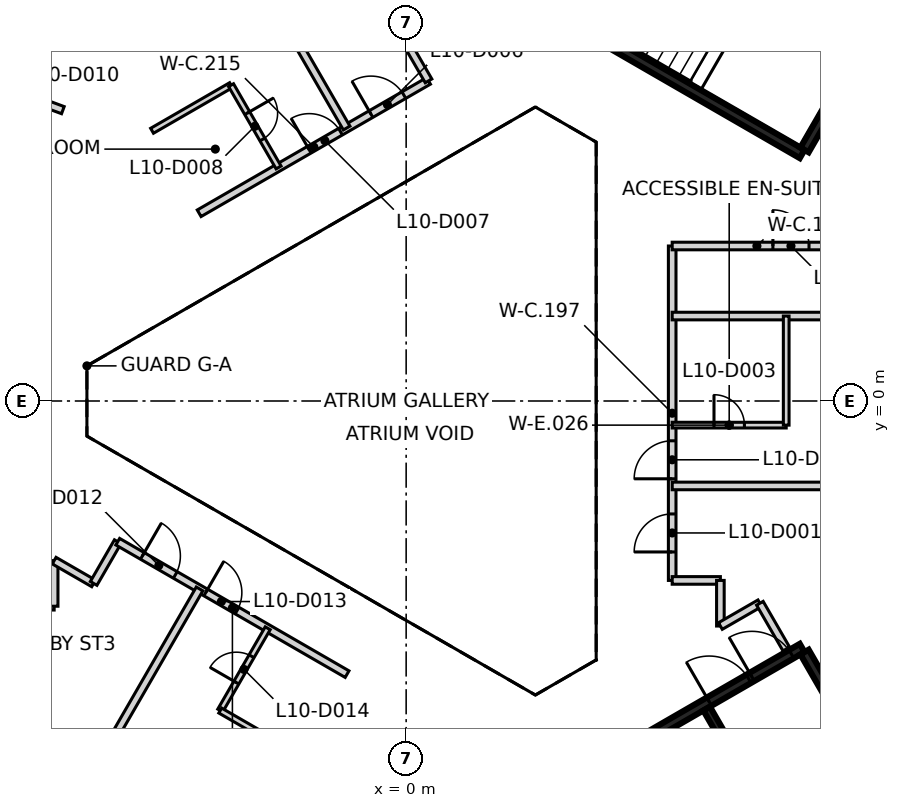
"""IFC4 building model, lengths in metres.
Left out: names, types, materials, properties, quantities, classifications, styles, units other than length and angle.
Written with IfcOpenShell. Run it as: python <this file> out.ifc"""

import sys

from ifc_helpers import new_model, si_unit, direction, frame, frame_2d, origin, place, context, subcontext, project, spatial, rectangle, extrude, element, fill, save


model = new_model("IFC4")
c1 = context("Model", 3, precision=1e-05, world=origin(), true_north=direction((0.0, 1.0)))
c2 = subcontext(c1, "Body", "Model", "MODEL_VIEW")
j1 = project(units=[si_unit("LENGTHUNIT", "METRE"), si_unit("PLANEANGLEUNIT", "RADIAN")], contexts=[c1])
p1 = place(None, origin())
s1 = spatial("IfcSite", under=j1, at=p1, CompositionType="ELEMENT")
p2 = place(p1, origin())
s2 = spatial("IfcBuilding", under=s1, at=p2, CompositionType="ELEMENT")
p3 = place(p2, frame((0.0, 0.0, 49.4)))
s3 = spatial("IfcBuildingStorey", under=s2, at=p3, CompositionType="ELEMENT", Elevation=49.4)
p4 = place(p3, frame((10.42, 6.498, 0.0), z_axis=(0.0, 0.0, 1.0), x_axis=(-0.866021906294, 0.500006057782, 0.0)))
e1 = element("IfcWall", 1, at=p4, inside=s3, PredefinedType="SHEAR", context=c2, shape_type="SweptSolid", body=[
    extrude(rectangle(XDim=11.55, YDim=0.25, at=frame_2d((5.775, 0.0))), origin(), (0.0, 0.0, 1.0), 3.125),
])
p5 = place(p4, frame((10.025, 0.0, 0.0)))
e2 = element("IfcOpeningElement", 2, at=p5, cuts=e1, PredefinedType="OPENING", context=c2, shape_type="SweptSolid", body=[
    extrude(rectangle(XDim=1.2, YDim=2.1, at=frame_2d((0.6, 1.05))), frame((0.0, 0.135, 0.0), z_axis=(0.0, -1.0, 0.0), x_axis=(1.0, 0.0, 0.0)), (0.0, 0.0, 1.0), 0.27),
])
p6 = place(p4, frame((8.725, 0.0, 0.0)))
e3 = element("IfcOpeningElement", 3, at=p6, cuts=e1, PredefinedType="OPENING", context=c2, shape_type="SweptSolid", body=[
    extrude(rectangle(XDim=1.2, YDim=2.1, at=frame_2d((0.6, 1.05))), frame((0.0, 0.135, 0.0), z_axis=(0.0, -1.0, 0.0), x_axis=(1.0, 0.0, 0.0)), (0.0, 0.0, 1.0), 0.27),
])
p7 = place(p3, frame((13.238, 11.378, 0.0), z_axis=(0.0, 0.0, 1.0), x_axis=(-0.500008851346, -0.866020293397, 0.0)))
e4 = element("IfcWall", 4, at=p7, inside=s3, PredefinedType="SHEAR", context=c2, shape_type="SweptSolid", body=[
    extrude(rectangle(XDim=5.51, YDim=0.25, at=frame_2d((2.755, 0.0))), origin(), (0.0, 0.0, 1.0), 3.125),
])
p8 = place(p3, frame((0.417, -12.273, 0.0), z_axis=(0.0, 0.0, 1.0), x_axis=(0.866021906294, 0.500006057782, 0.0)))
e5 = element("IfcWall", 5, at=p8, inside=s3, PredefinedType="SHEAR", context=c2, shape_type="SweptSolid", body=[
    extrude(rectangle(XDim=11.55, YDim=0.25, at=frame_2d((5.775, 0.0))), origin(), (0.0, 0.0, 1.0), 3.125),
])
p9 = place(p8, frame((10.025, 0.0, 0.0)))
e6 = element("IfcOpeningElement", 6, at=p9, cuts=e5, PredefinedType="OPENING", context=c2, shape_type="SweptSolid", body=[
    extrude(rectangle(XDim=1.2, YDim=2.1, at=frame_2d((0.6, 1.05))), frame((0.0, 0.135, 0.0), z_axis=(0.0, -1.0, 0.0), x_axis=(1.0, 0.0, 0.0)), (0.0, 0.0, 1.0), 0.27),
])
p10 = place(p8, frame((8.725, 0.0, 0.0)))
e7 = element("IfcOpeningElement", 7, at=p10, cuts=e5, PredefinedType="OPENING", context=c2, shape_type="SweptSolid", body=[
    extrude(rectangle(XDim=1.2, YDim=2.1, at=frame_2d((0.6, 1.05))), frame((0.0, 0.135, 0.0), z_axis=(0.0, -1.0, 0.0), x_axis=(1.0, 0.0, 0.0)), (0.0, 0.0, 1.0), 0.27),
])
p11 = place(p3, frame((10.483, -6.606, 0.0), z_axis=(0.0, 0.0, 1.0), x_axis=(0.49999885962, -0.866026062182, 0.0)))
e8 = element("IfcWall", 8, at=p11, inside=s3, PredefinedType="SHEAR", context=c2, shape_type="SweptSolid", body=[
    extrude(rectangle(XDim=5.225, YDim=0.25, at=frame_2d((2.612, 0.0))), origin(), (0.0, 0.0, 1.0), 3.125),
])
p12 = place(p3, frame((7.906, -8.094, 0.0), z_axis=(0.0, 0.0, 1.0), x_axis=(0.500024287448, -0.866011380966, 0.0)))
e9 = element("IfcWall", 9, at=p12, inside=s3, PredefinedType="SHEAR", context=c2, shape_type="SweptSolid", body=[
    extrude(rectangle(XDim=5.251, YDim=0.2, at=frame_2d((2.625, 0.0))), origin(), (0.0, 0.0, 1.0), 3.125),
])
p13 = place(p12, frame((1.849, 0.0, 0.0)))
e10 = element("IfcOpeningElement", 10, at=p13, cuts=e9, PredefinedType="OPENING", context=c2, shape_type="SweptSolid", body=[
    extrude(rectangle(XDim=1.4, YDim=2.1, at=frame_2d((0.7, 1.05))), frame((0.0, 0.11, 0.0), z_axis=(0.0, -1.0, 0.0), x_axis=(1.0, 0.0, 0.0)), (0.0, 0.0, 1.0), 0.22),
])
p14 = place(p3, frame((-16.026, 10.246, 0.0), z_axis=(0.0, 0.0, 1.0), x_axis=(0.937598236139, -0.347720502112, 0.0)))
e11 = element("IfcWall", 11, at=p14, inside=s3, PredefinedType="PARTITIONING", context=c2, shape_type="SweptSolid", body=[
    extrude(rectangle(XDim=7.458, YDim=0.2, at=frame_2d((3.729, 0.0))), origin(), (0.0, 0.0, 1.0), 3.125),
])
p15 = place(p14, frame((3.396, 0.0, 0.0)))
e12 = element("IfcOpeningElement", 12, at=p15, cuts=e11, PredefinedType="OPENING", context=c2, shape_type="SweptSolid", body=[
    extrude(rectangle(XDim=0.95, YDim=2.1, at=frame_2d((0.475, 1.05))), frame((0.0, 0.11, 0.0), z_axis=(0.0, -1.0, 0.0), x_axis=(1.0, 0.0, 0.0)), (0.0, 0.0, 1.0), 0.22),
])
p16 = place(p3, frame((-10.652, -5.4, 0.0), z_axis=(0.0, 0.0, 1.0), x_axis=(1.0, 0.0, 0.0)))
e13 = element("IfcWall", 13, at=p16, inside=s3, PredefinedType="PARTITIONING", context=c2, shape_type="SweptSolid", body=[
    extrude(rectangle(XDim=1.39, YDim=0.2, at=frame_2d((0.695, 0.0))), origin(), (0.0, 0.0, 1.0), 3.125),
])
for number, where, z_axis, x_axis in (
    (14, (-9.262, -5.4, 0.0), (0.0, 0.0, 1.0), (0.0, 1.0, 0.0)),
    (15, (-9.262, -4.2, 0.0), (0.0, 0.0, 1.0), (0.866, -0.5, 0.0)),
):
    element("IfcWall", number, at=place(p3, frame(where, z_axis=z_axis, x_axis=x_axis)), inside=s3, PredefinedType="PARTITIONING", context=c2, shape_type="SweptSolid", body=[
        extrude(rectangle(XDim=1.2, YDim=0.2, at=frame_2d((0.6, 0.0))), origin(), (0.0, 0.0, 1.0), 3.125),
    ])
p17 = place(p3, frame((-8.223, -4.8, 0.0), z_axis=(0.0, 0.0, 1.0), x_axis=(0.499866914522, 0.866102227088, 0.0)))
e16 = element("IfcWall", 16, at=p17, inside=s3, PredefinedType="PARTITIONING", context=c2, shape_type="SweptSolid", body=[
    extrude(rectangle(XDim=1.268, YDim=0.2, at=frame_2d((0.634, 0.0))), origin(), (0.0, 0.0, 1.0), 3.125),
])
p18 = place(p3, frame((-7.589, -3.702, 0.0), z_axis=(0.0, 0.0, 1.0), x_axis=(0.865994210678, -0.500054024153, 0.0)))
e17 = element("IfcWall", 17, at=p18, inside=s3, PredefinedType="PARTITIONING", context=c2, shape_type="SweptSolid", body=[
    extrude(rectangle(XDim=6.969, YDim=0.2, at=frame_2d((3.484, 0.0))), origin(), (0.0, 0.0, 1.0), 3.125),
])
p19 = place(p18, frame((0.749, 0.0, 0.0)))
e18 = element("IfcOpeningElement", 18, at=p19, cuts=e17, PredefinedType="OPENING", context=c2, shape_type="SweptSolid", body=[
    extrude(rectangle(XDim=1.0, YDim=2.1, at=frame_2d((0.5, 1.05))), frame((0.0, 0.11, 0.0), z_axis=(0.0, -1.0, 0.0), x_axis=(1.0, 0.0, 0.0)), (0.0, 0.0, 1.0), 0.22),
])
p20 = place(p18, frame((2.674, 0.0, 0.0)))
e19 = element("IfcOpeningElement", 19, at=p20, cuts=e17, PredefinedType="OPENING", context=c2, shape_type="SweptSolid", body=[
    extrude(rectangle(XDim=0.95, YDim=2.1, at=frame_2d((0.475, 1.05))), frame((0.0, 0.11, 0.0), z_axis=(0.0, -1.0, 0.0), x_axis=(1.0, 0.0, 0.0)), (0.0, 0.0, 1.0), 0.22),
])
p21 = place(p3, frame((-5.446, 4.94, 0.0), z_axis=(0.0, 0.0, 1.0), x_axis=(0.866096332545, 0.499877127655, 0.0)))
e20 = element("IfcWall", 20, at=p21, inside=s3, PredefinedType="PARTITIONING", context=c2, shape_type="SweptSolid", body=[
    extrude(rectangle(XDim=6.969, YDim=0.2, at=frame_2d((3.484, 0.0))), origin(), (0.0, 0.0, 1.0), 3.125),
])
p22 = place(p21, frame((5.219, 0.0, 0.0)))
e21 = element("IfcOpeningElement", 21, at=p22, cuts=e20, PredefinedType="OPENING", context=c2, shape_type="SweptSolid", body=[
    extrude(rectangle(XDim=1.0, YDim=2.1, at=frame_2d((0.5, 1.05))), frame((0.0, 0.11, 0.0), z_axis=(0.0, -1.0, 0.0), x_axis=(1.0, 0.0, 0.0)), (0.0, 0.0, 1.0), 0.22),
])
p23 = place(p21, frame((3.344, 0.0, 0.0)))
e22 = element("IfcOpeningElement", 22, at=p23, cuts=e20, PredefinedType="OPENING", context=c2, shape_type="SweptSolid", body=[
    extrude(rectangle(XDim=0.95, YDim=2.1, at=frame_2d((0.475, 1.05))), frame((0.0, 0.11, 0.0), z_axis=(0.0, -1.0, 0.0), x_axis=(1.0, 0.0, 0.0)), (0.0, 0.0, 1.0), 0.22),
])
p24 = place(p3, frame((-0.045, 9.521, 0.0), z_axis=(0.0, 0.0, 1.0), x_axis=(0.500094716449, -0.865970712311, 0.0)))
e23 = element("IfcWall", 23, at=p24, inside=s3, PredefinedType="PARTITIONING", context=c2, shape_type="SweptSolid", body=[
    extrude(rectangle(XDim=1.268, YDim=0.2, at=frame_2d((0.634, 0.0))), origin(), (0.0, 0.0, 1.0), 3.125),
])
p25 = place(p3, frame((7.0, -4.721, 0.0), z_axis=(0.0, 0.0, 1.0), x_axis=(0.0, 1.0, 0.0)))
e24 = element("IfcWall", 24, at=p25, inside=s3, PredefinedType="PARTITIONING", context=c2, shape_type="SweptSolid", body=[
    extrude(rectangle(XDim=8.799, YDim=0.2, at=frame_2d((4.399, 0.0))), origin(), (0.0, 0.0, 1.0), 3.125),
])
p26 = place(p25, frame((0.749, 0.0, 0.0)))
e25 = element("IfcOpeningElement", 25, at=p26, cuts=e24, PredefinedType="OPENING", context=c2, shape_type="SweptSolid", body=[
    extrude(rectangle(XDim=1.0, YDim=2.1, at=frame_2d((0.5, 1.05))), frame((0.0, 0.11, 0.0), z_axis=(0.0, -1.0, 0.0), x_axis=(1.0, 0.0, 0.0)), (0.0, 0.0, 1.0), 0.22),
])
p27 = place(p25, frame((2.674, 0.0, 0.0)))
e26 = element("IfcOpeningElement", 26, at=p27, cuts=e24, PredefinedType="OPENING", context=c2, shape_type="SweptSolid", body=[
    extrude(rectangle(XDim=1.0, YDim=2.1, at=frame_2d((0.5, 1.05))), frame((0.0, 0.11, 0.0), z_axis=(0.0, -1.0, 0.0), x_axis=(1.0, 0.0, 0.0)), (0.0, 0.0, 1.0), 0.22),
])
p28 = place(p3, frame((7.0, -4.721, 0.0), z_axis=(0.0, 0.0, 1.0), x_axis=(1.0, 0.0, 0.0)))
e27 = element("IfcWall", 27, at=p28, inside=s3, PredefinedType="PARTITIONING", context=c2, shape_type="SweptSolid", body=[
    extrude(rectangle(XDim=1.268, YDim=0.2, at=frame_2d((0.634, 0.0))), origin(), (0.0, 0.0, 1.0), 3.125),
])
p29 = place(p3, frame((7.0, 4.078, 0.0), z_axis=(0.0, 0.0, 1.0), x_axis=(1.0, 0.0, 0.0)))
e28 = element("IfcWall", 28, at=p29, inside=s3, PredefinedType="PARTITIONING", context=c2, shape_type="SweptSolid", body=[
    extrude(rectangle(XDim=4.458, YDim=0.2, at=frame_2d((2.229, 0.0))), origin(), (0.0, 0.0, 1.0), 3.125),
])
p30 = place(p29, frame((2.65, 0.0, 0.0)))
e29 = element("IfcOpeningElement", 29, at=p30, cuts=e28, PredefinedType="OPENING", context=c2, shape_type="SweptSolid", body=[
    extrude(rectangle(XDim=0.95, YDim=2.1, at=frame_2d((0.475, 1.05))), frame((0.0, 0.11, 0.0), z_axis=(0.0, -1.0, 0.0), x_axis=(1.0, 0.0, 0.0)), (0.0, 0.0, 1.0), 0.22),
])
p31 = place(p3, frame((8.268, -5.921, 0.0), z_axis=(0.0, 0.0, 1.0), x_axis=(0.0, 1.0, 0.0)))
e30 = element("IfcWall", 30, at=p31, inside=s3, PredefinedType="PARTITIONING", context=c2, shape_type="SweptSolid", body=[
    extrude(rectangle(XDim=1.2, YDim=0.2, at=frame_2d((0.6, 0.0))), origin(), (0.0, 0.0, 1.0), 3.125),
])
p32 = place(p3, frame((8.268, -5.921, 0.0), z_axis=(0.0, 0.0, 1.0), x_axis=(0.866344856625, 0.499446282797, 0.0)))
e31 = element("IfcWall", 31, at=p32, inside=s3, PredefinedType="PARTITIONING", context=c2, shape_type="SweptSolid", body=[
    extrude(rectangle(XDim=1.199, YDim=0.2, at=frame_2d((0.6, 0.0))), origin(), (0.0, 0.0, 1.0), 3.125),
])
p33 = place(p3, frame((9.307, -5.322, 0.0), z_axis=(0.0, 0.0, 1.0), x_axis=(0.500295157811, -0.865854927266, 0.0)))
e32 = element("IfcWall", 32, at=p33, inside=s3, PredefinedType="PARTITIONING", context=c2, shape_type="SweptSolid", body=[
    extrude(rectangle(XDim=1.39, YDim=0.2, at=frame_2d((0.695, 0.0))), origin(), (0.0, 0.0, 1.0), 3.125),
])
p34 = place(p3, frame((-14.148, -20.035, 0.0), z_axis=(0.0, 0.0, 1.0), x_axis=(0.499978771293, 0.866037659837, 0.0)))
e33 = element("IfcWall", 33, at=p34, inside=s3, PredefinedType="PARTITIONING", context=c2, shape_type="SweptSolid", body=[
    extrude(rectangle(XDim=17.425, YDim=0.2, at=frame_2d((8.712, 0.0))), origin(), (0.0, 0.0, 1.0), 3.125),
])
p35 = place(p3, frame((-10.276, 22.271, 0.0), z_axis=(0.0, 0.0, 1.0), x_axis=(0.499958184216, -0.866049544793, 0.0)))
e34 = element("IfcWall", 34, at=p35, inside=s3, PredefinedType="PARTITIONING", context=c2, shape_type="SweptSolid", body=[
    extrude(rectangle(XDim=17.422, YDim=0.2, at=frame_2d((8.711, 0.0))), origin(), (0.0, 0.0, 1.0), 3.125),
])
p36 = place(p3, frame((7.0, 2.235, 0.0), z_axis=(0.0, 0.0, 1.0), x_axis=(1.0, 0.0, 0.0)))
e35 = element("IfcWall", 35, at=p36, inside=s3, PredefinedType="PARTITIONING", context=c2, shape_type="SweptSolid", body=[
    extrude(rectangle(XDim=17.425, YDim=0.2, at=frame_2d((8.712, 0.0))), origin(), (0.0, 0.0, 1.0), 3.125),
])
p37 = place(p3, frame((7.001, -2.235, 0.0), z_axis=(0.0, 0.0, 1.0), x_axis=(1.0, 0.0, 0.0)))
e36 = element("IfcWall", 36, at=p37, inside=s3, PredefinedType="PARTITIONING", context=c2, shape_type="SweptSolid", body=[
    extrude(rectangle(XDim=17.424, YDim=0.2, at=frame_2d((8.712, 0.0))), origin(), (0.0, 0.0, 1.0), 3.125),
])
p38 = place(p3, frame((-6.686, 7.11, 0.0), z_axis=(0.0, 0.0, 1.0), x_axis=(0.866100915363, 0.499869187296, 0.0)))
e37 = element("IfcWall", 37, at=p38, inside=s3, PredefinedType="PARTITIONING", context=c2, shape_type="SweptSolid", body=[
    extrude(rectangle(XDim=2.401, YDim=0.15, at=frame_2d((1.2, 0.0))), origin(), (0.0, 0.0, 1.0), 3.125),
])
p39 = place(p3, frame((-4.892, -8.145, 0.0), z_axis=(0.0, 0.0, 1.0), x_axis=(0.499711178953, 0.866192090491, 0.0)))
e38 = element("IfcWall", 38, at=p39, inside=s3, PredefinedType="PARTITIONING", context=c2, shape_type="SweptSolid", body=[
    extrude(rectangle(XDim=2.5, YDim=0.15, at=frame_2d((1.25, 0.0))), origin(), (0.0, 0.0, 1.0), 3.125),
])
p40 = place(p39, frame((0.85, 0.0, 0.0)))
e39 = element("IfcOpeningElement", 39, at=p40, cuts=e38, PredefinedType="OPENING", context=c2, shape_type="SweptSolid", body=[
    extrude(rectangle(XDim=0.8, YDim=2.1, at=frame_2d((0.4, 1.05))), frame((0.0, 0.085, 0.0), z_axis=(0.0, -1.0, 0.0), x_axis=(1.0, 0.0, 0.0)), (0.0, 0.0, 1.0), 0.17),
])
p41 = place(p3, frame((-4.892, -8.145, 0.0), z_axis=(0.0, 0.0, 1.0), x_axis=(0.865999212041, -0.500045362686, 0.0)))
e40 = element("IfcWall", 40, at=p41, inside=s3, PredefinedType="PARTITIONING", context=c2, shape_type="SweptSolid", body=[
    extrude(rectangle(XDim=2.4, YDim=0.15, at=frame_2d((1.2, 0.0))), origin(), (0.0, 0.0, 1.0), 3.125),
])
p42 = place(p3, frame((-4.607, 8.31, 0.0), z_axis=(0.0, 0.0, 1.0), x_axis=(0.500004234368, -0.866022959057, 0.0)))
e41 = element("IfcWall", 41, at=p42, inside=s3, PredefinedType="PARTITIONING", context=c2, shape_type="SweptSolid", body=[
    extrude(rectangle(XDim=2.5, YDim=0.15, at=frame_2d((1.25, 0.0))), origin(), (0.0, 0.0, 1.0), 3.125),
])
p43 = place(p42, frame((0.85, 0.0, 0.0)))
e42 = element("IfcOpeningElement", 42, at=p43, cuts=e41, PredefinedType="OPENING", context=c2, shape_type="SweptSolid", body=[
    extrude(rectangle(XDim=0.8, YDim=2.1, at=frame_2d((0.4, 1.05))), frame((0.0, 0.085, 0.0), z_axis=(0.0, -1.0, 0.0), x_axis=(1.0, 0.0, 0.0)), (0.0, 0.0, 1.0), 0.17),
])
p44 = place(p3, frame((7.0, -0.635, 0.0), z_axis=(0.0, 0.0, 1.0), x_axis=(1.0, 0.0, 0.0)))
e43 = element("IfcWall", 43, at=p44, inside=s3, PredefinedType="PARTITIONING", context=c2, shape_type="SweptSolid", body=[
    extrude(rectangle(XDim=3.0, YDim=0.15, at=frame_2d((1.5, 0.0))), origin(), (0.0, 0.0, 1.0), 3.125),
])
p45 = place(p44, frame((1.1, 0.0, 0.0)))
e44 = element("IfcOpeningElement", 44, at=p45, cuts=e43, PredefinedType="OPENING", context=c2, shape_type="SweptSolid", body=[
    extrude(rectangle(XDim=0.8, YDim=2.1, at=frame_2d((0.4, 1.05))), frame((0.0, 0.085, 0.0), z_axis=(0.0, -1.0, 0.0), x_axis=(1.0, 0.0, 0.0)), (0.0, 0.0, 1.0), 0.17),
])
p46 = place(p3, frame((10.0, -0.635, 0.0), z_axis=(0.0, 0.0, 1.0), x_axis=(0.0, 1.0, 0.0)))
e45 = element("IfcWall", 45, at=p46, inside=s3, PredefinedType="PARTITIONING", context=c2, shape_type="SweptSolid", body=[
    extrude(rectangle(XDim=2.87, YDim=0.15, at=frame_2d((1.435, 0.0))), origin(), (0.0, 0.0, 1.0), 3.125),
])
p47 = place(p9, origin())
e46 = element("IfcDoor", 46, at=p47, inside=s3, OperationType="SINGLE_SWING_LEFT", PredefinedType="DOOR", context=c2, shape_type="SweptSolid", body=[
    extrude(rectangle(XDim=1.2, YDim=2.1, at=frame_2d((0.6, 1.05))), frame((0.0, 0.025, 0.0), z_axis=(0.0, -1.0, 0.0), x_axis=(1.0, 0.0, 0.0)), (0.0, 0.0, 1.0), 0.05),
])
fill(e6, e46)
p48 = place(p10, origin())
e47 = element("IfcDoor", 47, at=p48, inside=s3, OperationType="SINGLE_SWING_RIGHT", PredefinedType="DOOR", context=c2, shape_type="SweptSolid", body=[
    extrude(rectangle(XDim=1.2, YDim=2.1, at=frame_2d((0.6, 1.05))), frame((0.0, 0.025, 0.0), z_axis=(0.0, -1.0, 0.0), x_axis=(1.0, 0.0, 0.0)), (0.0, 0.0, 1.0), 0.05),
])
fill(e7, e47)
p49 = place(p26, frame((1.0, 0.0, 0.0), z_axis=(0.0, 0.0, 1.0), x_axis=(-1.0, 0.0, 0.0)))
e48 = element("IfcDoor", 48, at=p49, inside=s3, OperationType="SINGLE_SWING_LEFT", PredefinedType="DOOR", context=c2, shape_type="SweptSolid", body=[
    extrude(rectangle(XDim=1.0, YDim=2.1, at=frame_2d((0.5, 1.05))), frame((0.0, 0.025, 0.0), z_axis=(0.0, -1.0, 0.0), x_axis=(1.0, 0.0, 0.0)), (0.0, 0.0, 1.0), 0.05),
])
fill(e25, e48)
p50 = place(p27, frame((1.0, 0.0, 0.0), z_axis=(0.0, 0.0, 1.0), x_axis=(-1.0, 0.0, 0.0)))
e49 = element("IfcDoor", 49, at=p50, inside=s3, OperationType="SINGLE_SWING_LEFT", PredefinedType="DOOR", context=c2, shape_type="SweptSolid", body=[
    extrude(rectangle(XDim=1.0, YDim=2.1, at=frame_2d((0.5, 1.05))), frame((0.0, 0.025, 0.0), z_axis=(0.0, -1.0, 0.0), x_axis=(1.0, 0.0, 0.0)), (0.0, 0.0, 1.0), 0.05),
])
fill(e26, e49)
p51 = place(p45, origin())
e50 = element("IfcDoor", 50, at=p51, inside=s3, OperationType="SINGLE_SWING_LEFT", PredefinedType="DOOR", context=c2, shape_type="SweptSolid", body=[
    extrude(rectangle(XDim=0.8, YDim=2.1, at=frame_2d((0.4, 1.05))), frame((0.0, 0.025, 0.0), z_axis=(0.0, -1.0, 0.0), x_axis=(1.0, 0.0, 0.0)), (0.0, 0.0, 1.0), 0.05),
])
fill(e44, e50)
p52 = place(p30, origin())
e51 = element("IfcDoor", 51, at=p52, inside=s3, OperationType="SINGLE_SWING_LEFT", PredefinedType="DOOR", context=c2, shape_type="SweptSolid", body=[
    extrude(rectangle(XDim=0.95, YDim=2.1, at=frame_2d((0.475, 1.05))), frame((0.0, 0.025, 0.0), z_axis=(0.0, -1.0, 0.0), x_axis=(1.0, 0.0, 0.0)), (0.0, 0.0, 1.0), 0.05),
])
fill(e29, e51)
p53 = place(p22, origin())
e52 = element("IfcDoor", 52, at=p53, inside=s3, OperationType="SINGLE_SWING_LEFT", PredefinedType="DOOR", context=c2, shape_type="SweptSolid", body=[
    extrude(rectangle(XDim=1.0, YDim=2.1, at=frame_2d((0.5, 1.05))), frame((0.0, 0.025, 0.0), z_axis=(0.0, -1.0, 0.0), x_axis=(1.0, 0.0, 0.0)), (0.0, 0.0, 1.0), 0.05),
])
fill(e21, e52)
p54 = place(p23, origin())
e53 = element("IfcDoor", 53, at=p54, inside=s3, OperationType="SINGLE_SWING_LEFT", PredefinedType="DOOR", context=c2, shape_type="SweptSolid", body=[
    extrude(rectangle(XDim=0.95, YDim=2.1, at=frame_2d((0.475, 1.05))), frame((0.0, 0.025, 0.0), z_axis=(0.0, -1.0, 0.0), x_axis=(1.0, 0.0, 0.0)), (0.0, 0.0, 1.0), 0.05),
])
fill(e22, e53)
p55 = place(p43, frame((0.8, 0.0, 0.0), z_axis=(0.0, 0.0, 1.0), x_axis=(-1.0, 0.0, 0.0)))
e54 = element("IfcDoor", 54, at=p55, inside=s3, OperationType="SINGLE_SWING_LEFT", PredefinedType="DOOR", context=c2, shape_type="SweptSolid", body=[
    extrude(rectangle(XDim=0.8, YDim=2.1, at=frame_2d((0.4, 1.05))), frame((0.0, 0.025, 0.0), z_axis=(0.0, -1.0, 0.0), x_axis=(1.0, 0.0, 0.0)), (0.0, 0.0, 1.0), 0.05),
])
fill(e42, e54)
p56 = place(p19, frame((1.0, 0.0, 0.0), z_axis=(0.0, 0.0, 1.0), x_axis=(-1.0, 0.0, 0.0)))
e55 = element("IfcDoor", 55, at=p56, inside=s3, OperationType="SINGLE_SWING_LEFT", PredefinedType="DOOR", context=c2, shape_type="SweptSolid", body=[
    extrude(rectangle(XDim=1.0, YDim=2.1, at=frame_2d((0.5, 1.05))), frame((0.0, 0.025, 0.0), z_axis=(0.0, -1.0, 0.0), x_axis=(1.0, 0.0, 0.0)), (0.0, 0.0, 1.0), 0.05),
])
fill(e18, e55)
p57 = place(p20, frame((0.95, 0.0, 0.0), z_axis=(0.0, 0.0, 1.0), x_axis=(-1.0, 0.0, 0.0)))
e56 = element("IfcDoor", 56, at=p57, inside=s3, OperationType="SINGLE_SWING_LEFT", PredefinedType="DOOR", context=c2, shape_type="SweptSolid", body=[
    extrude(rectangle(XDim=0.95, YDim=2.1, at=frame_2d((0.475, 1.05))), frame((0.0, 0.025, 0.0), z_axis=(0.0, -1.0, 0.0), x_axis=(1.0, 0.0, 0.0)), (0.0, 0.0, 1.0), 0.05),
])
fill(e19, e56)
p58 = place(p40, frame((0.8, 0.0, 0.0), z_axis=(0.0, 0.0, 1.0), x_axis=(-1.0, 0.0, 0.0)))
e57 = element("IfcDoor", 57, at=p58, inside=s3, OperationType="SINGLE_SWING_LEFT", PredefinedType="DOOR", context=c2, shape_type="SweptSolid", body=[
    extrude(rectangle(XDim=0.8, YDim=2.1, at=frame_2d((0.4, 1.05))), frame((0.0, 0.025, 0.0), z_axis=(0.0, -1.0, 0.0), x_axis=(1.0, 0.0, 0.0)), (0.0, 0.0, 1.0), 0.05),
])
fill(e39, e57)
save(model, sys.argv[1])
